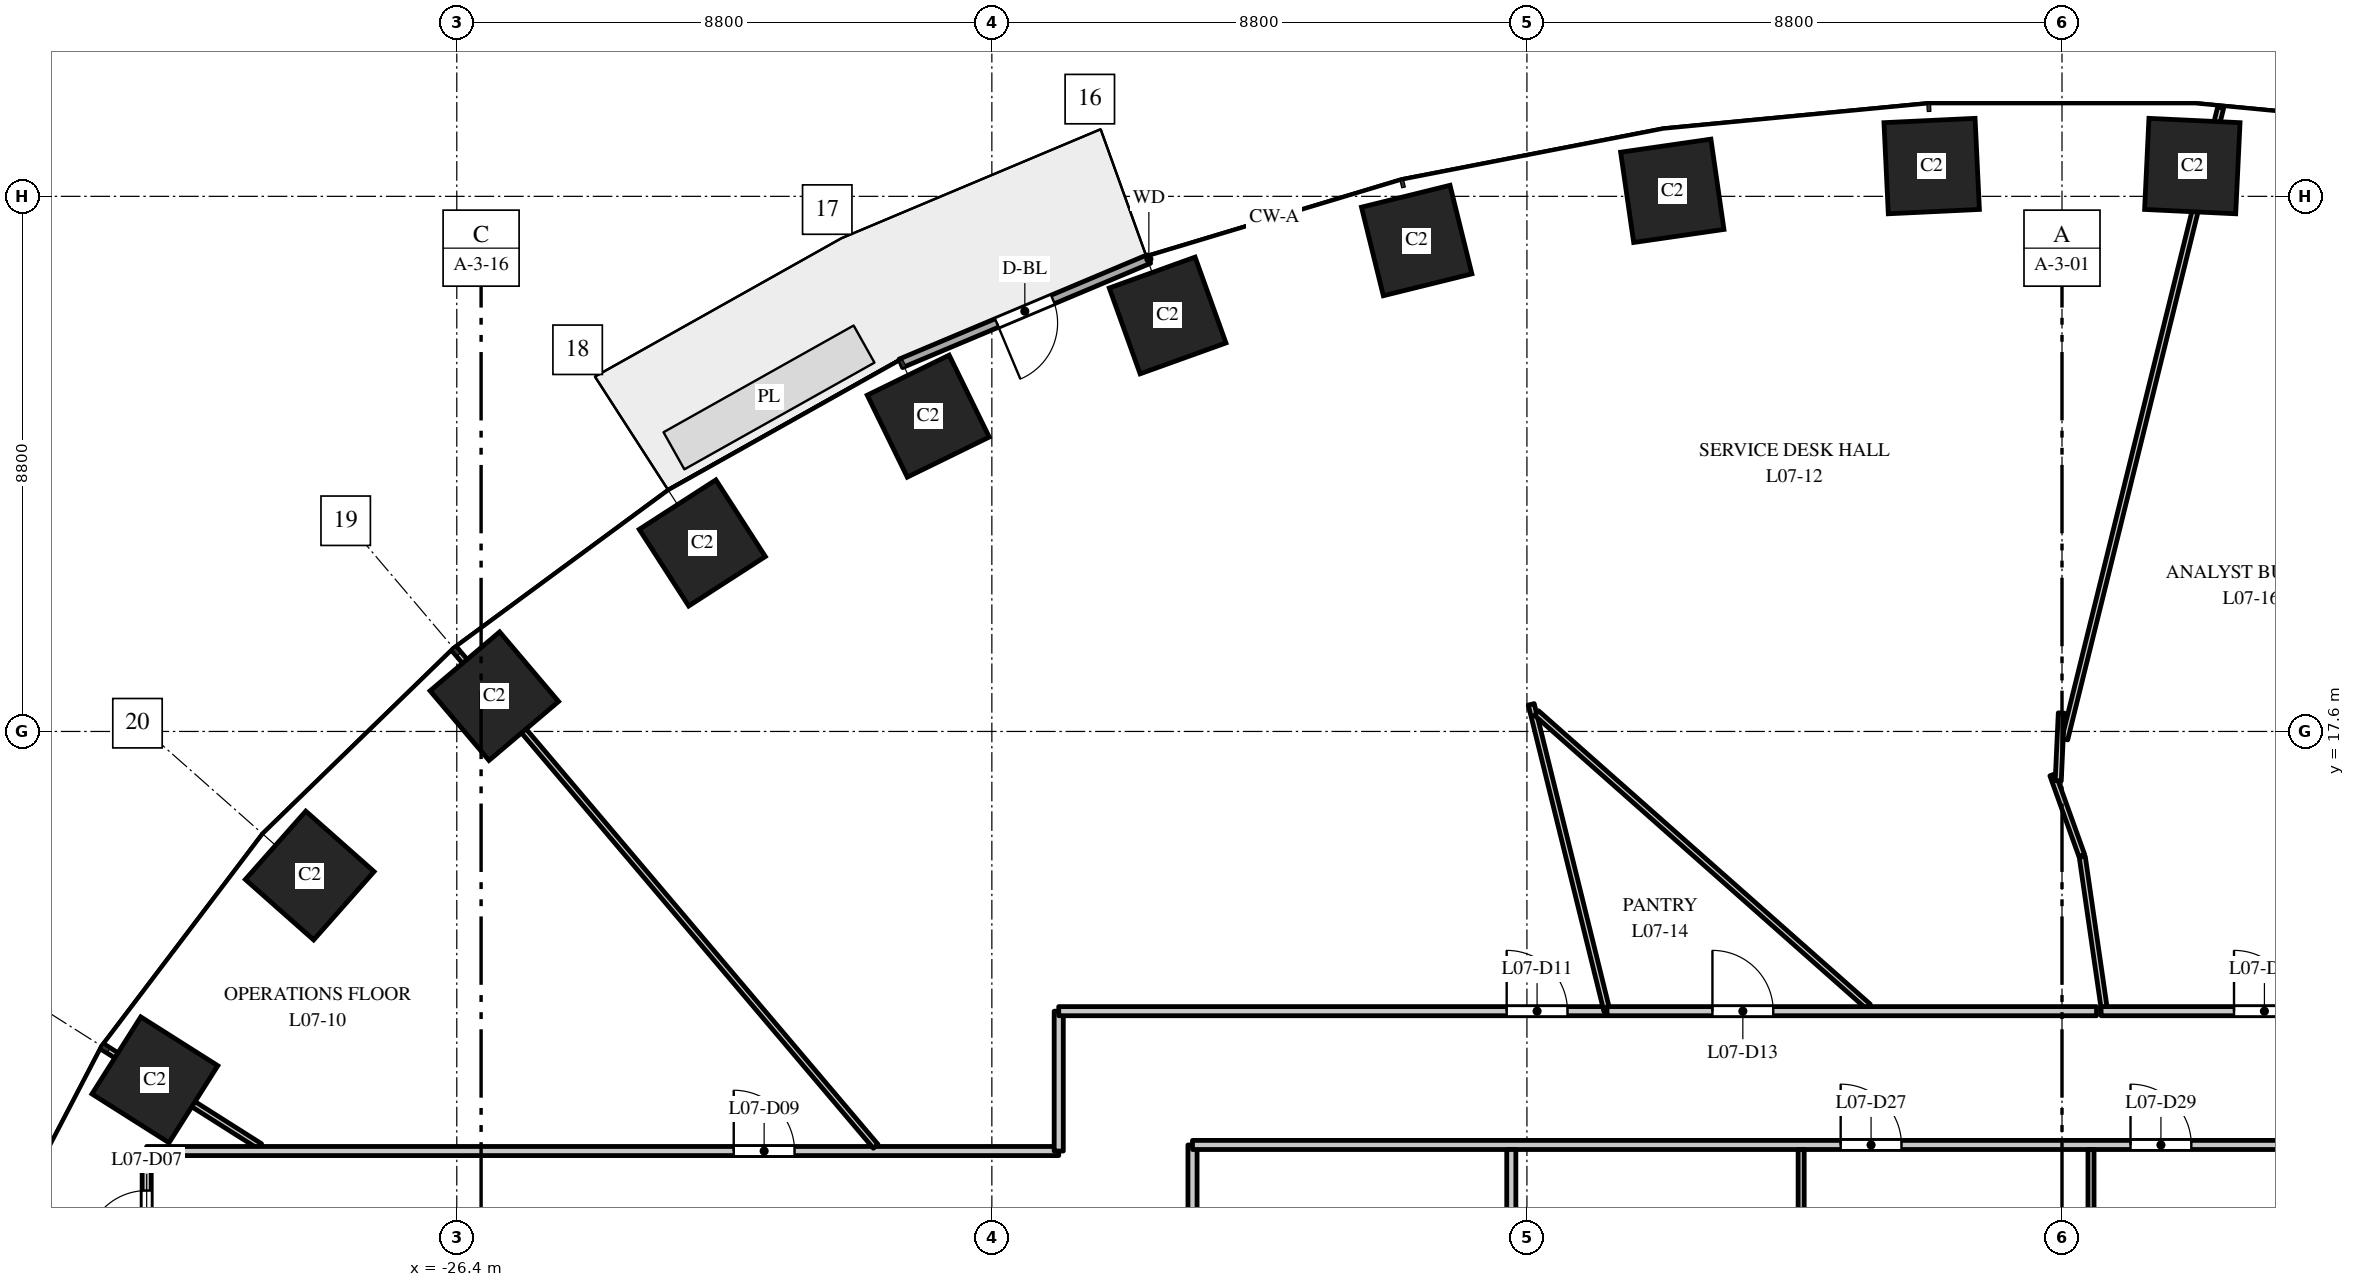
"""IFC4 building model, lengths in metres.
Left out: names, types, materials, properties, quantities, classifications, styles, units other than length and angle.
Written with IfcOpenShell. Run it as: python <this file> out.ifc"""

import sys

from ifc_helpers import new_model, si_unit, direction, frame, frame_2d, origin, origin_2d, place, context, subcontext, project, spatial, rectangle, extrude, element, fill, save


model = new_model("IFC4")
c1 = context("Model", 3, precision=1e-05, world=origin(), true_north=direction((0.0, 1.0)))
c2 = subcontext(c1, "Body", "Model", "MODEL_VIEW")
j1 = project(units=[si_unit("LENGTHUNIT", "METRE"), si_unit("PLANEANGLEUNIT", "RADIAN")], contexts=[c1])
p1 = place(None, origin())
s1 = spatial("IfcSite", under=j1, at=p1, CompositionType="ELEMENT")
p2 = place(p1, origin())
s2 = spatial("IfcBuilding", under=s1, at=p2, CompositionType="ELEMENT")
p3 = place(p2, frame((0.0, 0.0, 38.5)))
s3 = spatial("IfcBuildingStorey", under=s2, at=p3, CompositionType="ELEMENT", Elevation=38.5)
for number, where, z_axis, x_axis in (
    (1, (2.143, 26.898, 0.0), (0.0, 0.0, 1.0), (-0.999, 0.048, 0.0)),
    (2, (-2.143, 26.898, 0.0), (0.0, 0.0, 1.0), (-0.999, -0.048, 0.0)),
    (3, (-6.409, 26.491, 0.0), (0.0, 0.0, 1.0), (-0.99, -0.143, 0.0)),
    (4, (-10.613, 25.674, 0.0), (0.0, 0.0, 1.0), (-0.971, -0.24, 0.0)),
    (5, (-14.709, 24.441, 0.0), (0.0, 0.0, 1.0), (-0.941, -0.338, 0.0)),
    (6, (-18.646, 22.785, 0.0), (0.0, 0.0, 1.0), (-0.898, -0.439, 0.0)),
    (7, (-22.362, 20.7, 0.0), (0.0, 0.0, 1.0), (-0.84, -0.542, 0.0)),
    (8, (-25.783, 18.18, 0.0), (0.0, 0.0, 1.0), (-0.763, -0.646, 0.0)),
    (9, (-28.819, 15.23, 0.0), (0.0, 0.0, 1.0), (-0.663, -0.749, 0.0)),
    (10, (-31.365, 11.871, 0.0), (0.0, 0.0, 1.0), (-0.535, -0.845, 0.0)),
):
    element("IfcColumn", number, at=place(p3, frame(where, z_axis=z_axis, x_axis=x_axis)), inside=s3, PredefinedType="COLUMN", context=c2, shape_type="SweptSolid", body=[
        extrude(rectangle(XDim=1.5, YDim=1.5, at=origin_2d()), origin(), (0.0, 0.0, 1.0), 4.0),
    ])
p4 = place(p3, frame((-15.018, 25.369, 0.0), z_axis=(0.0, 0.0, 1.0), x_axis=(-0.921816985161, -0.387625393736, 0.0)))
e11 = element("IfcWall", 11, at=p4, inside=s3, PredefinedType="STANDARD", context=c2, shape_type="SweptSolid", body=[
    extrude(rectangle(XDim=4.426, YDim=0.15, at=frame_2d((2.213, 0.0))), origin(), (0.0, 0.0, 1.0), 3.7),
])
p5 = place(p4, frame((1.713, 0.0, 0.0)))
e12 = element("IfcOpeningElement", 12, at=p5, cuts=e11, PredefinedType="OPENING", context=c2, shape_type="SweptSolid", body=[
    extrude(rectangle(XDim=1.0, YDim=2.4, at=frame_2d((0.5, 1.2))), frame((0.0, 0.085, 0.0), z_axis=(0.0, -1.0, 0.0), x_axis=(1.0, 0.0, 0.0)), (0.0, 0.0, 1.0), 0.17),
])
p6 = place(p3, frame((-32.212, 12.408, 0.0), z_axis=(0.0, 0.0, 1.0), x_axis=(0.844810627195, -0.535065420467, 0.0)))
e13 = element("IfcWall", 13, at=p6, inside=s3, PredefinedType="PARTITIONING", context=c2, shape_type="SweptSolid", body=[
    extrude(rectangle(XDim=3.048, YDim=0.1, at=frame_2d((1.524, 0.0))), origin(), (0.0, 0.0, 1.0), 3.7),
])
p7 = place(p3, frame((-31.5, 8.5, 0.0), z_axis=(0.0, 0.0, 1.0), x_axis=(0.0, 1.0, 0.0)))
e14 = element("IfcWall", 14, at=p7, inside=s3, PredefinedType="PARTITIONING", context=c2, shape_type="SweptSolid", body=[
    extrude(rectangle(XDim=2.2, YDim=0.15, at=frame_2d((1.1, 0.0))), origin(), (0.0, 0.0, 1.0), 3.7),
])
p8 = place(p7, frame((0.55, 0.0, 0.0)))
e15 = element("IfcOpeningElement", 15, at=p8, cuts=e14, PredefinedType="OPENING", context=c2, shape_type="SweptSolid", body=[
    extrude(rectangle(XDim=1.0, YDim=2.1, at=frame_2d((0.5, 1.05))), frame((0.0, 0.085, 0.0), z_axis=(0.0, -1.0, 0.0), x_axis=(1.0, 0.0, 0.0)), (0.0, 0.0, 1.0), 0.17),
])
p9 = place(p3, frame((-31.5, 10.7, 0.0), z_axis=(0.0, 0.0, 1.0), x_axis=(1.0, 0.0, 0.0)))
e16 = element("IfcWall", 16, at=p9, inside=s3, PredefinedType="PARTITIONING", context=c2, shape_type="SweptSolid", body=[
    extrude(rectangle(XDim=15.0, YDim=0.15, at=frame_2d((7.5, 0.0))), origin(), (0.0, 0.0, 1.0), 3.1),
])
p10 = place(p9, frame((9.655, 0.0, 0.0)))
e17 = element("IfcOpeningElement", 17, at=p10, cuts=e16, PredefinedType="OPENING", context=c2, shape_type="SweptSolid", body=[
    extrude(rectangle(XDim=1.0, YDim=2.1, at=frame_2d((0.5, 1.05))), frame((0.0, 0.085, 0.0), z_axis=(0.0, -1.0, 0.0), x_axis=(1.0, 0.0, 0.0)), (0.0, 0.0, 1.0), 0.17),
])
p11 = place(p3, frame((-26.43, 18.945, 0.0), z_axis=(0.0, 0.0, 1.0), x_axis=(0.646400187952, -0.762998556365, 0.0)))
e18 = element("IfcWall", 18, at=p11, inside=s3, PredefinedType="PARTITIONING", context=c2, shape_type="SweptSolid", body=[
    extrude(rectangle(XDim=10.704, YDim=0.1, at=frame_2d((5.352, 0.0))), origin(), (0.0, 0.0, 1.0), 3.7),
])
p12 = place(p3, frame((-16.5, 10.7, 0.0), z_axis=(0.0, 0.0, 1.0), x_axis=(0.0, 1.0, 0.0)))
e19 = element("IfcWall", 19, at=p12, inside=s3, PredefinedType="PARTITIONING", context=c2, shape_type="SweptSolid", body=[
    extrude(rectangle(XDim=2.3, YDim=0.15, at=frame_2d((1.15, 0.0))), origin(), (0.0, 0.0, 1.0), 2.75),
])
p13 = place(p3, frame((-16.5, 13.0, 0.0), z_axis=(0.0, 0.0, 1.0), x_axis=(1.0, 0.0, 0.0)))
e20 = element("IfcWall", 20, at=p13, inside=s3, PredefinedType="PARTITIONING", context=c2, shape_type="SweptSolid", body=[
    extrude(rectangle(XDim=9.001, YDim=0.15, at=frame_2d((4.5, 0.0))), origin(), (0.0, 0.0, 1.0), 2.85),
])
p14 = place(p13, frame((7.367, 0.0, 0.0)))
e21 = element("IfcOpeningElement", 21, at=p14, cuts=e20, PredefinedType="OPENING", context=c2, shape_type="SweptSolid", body=[
    extrude(rectangle(XDim=1.0, YDim=2.1, at=frame_2d((0.5, 1.05))), frame((0.0, 0.085, 0.0), z_axis=(0.0, -1.0, 0.0), x_axis=(1.0, 0.0, 0.0)), (0.0, 0.0, 1.0), 0.17),
])
p15 = place(p3, frame((-14.3, -10.8, 0.0), z_axis=(0.0, 0.0, 1.0), x_axis=(0.0, 1.0, 0.0)))
e22 = element("IfcWall", 22, at=p15, inside=s3, PredefinedType="PARTITIONING", context=c2, shape_type="SweptSolid", body=[
    extrude(rectangle(XDim=21.6, YDim=0.15, at=frame_2d((10.8, 0.0))), origin(), (0.0, 0.0, 1.0), 2.75),
])
p16 = place(p15, frame((0.65, 0.0, 0.0)))
e23 = element("IfcOpeningElement", 23, at=p16, cuts=e22, PredefinedType="OPENING", context=c2, shape_type="SweptSolid", body=[
    extrude(rectangle(XDim=1.0, YDim=2.1, at=frame_2d((0.5, 1.05))), frame((0.0, 0.085, 0.0), z_axis=(0.0, -1.0, 0.0), x_axis=(1.0, 0.0, 0.0)), (0.0, 0.0, 1.0), 0.17),
])
p17 = place(p3, frame((-14.3, 10.8, 0.0), z_axis=(0.0, 0.0, 1.0), x_axis=(1.0, 0.0, 0.0)))
e24 = element("IfcWall", 24, at=p17, inside=s3, PredefinedType="PARTITIONING", context=c2, shape_type="SweptSolid", body=[
    extrude(rectangle(XDim=28.6, YDim=0.15, at=frame_2d((14.3, 0.0))), origin(), (0.0, 0.0, 1.0), 2.85),
])
p18 = place(p17, frame((10.66, 0.0, 0.0)))
e25 = element("IfcOpeningElement", 25, at=p18, cuts=e24, PredefinedType="OPENING", context=c2, shape_type="SweptSolid", body=[
    extrude(rectangle(XDim=1.0, YDim=2.1, at=frame_2d((0.5, 1.05))), frame((0.0, 0.085, 0.0), z_axis=(0.0, -1.0, 0.0), x_axis=(1.0, 0.0, 0.0)), (0.0, 0.0, 1.0), 0.17),
])
p19 = place(p17, frame((15.427, 0.0, 0.0)))
e26 = element("IfcOpeningElement", 26, at=p19, cuts=e24, PredefinedType="OPENING", context=c2, shape_type="SweptSolid", body=[
    extrude(rectangle(XDim=1.0, YDim=2.1, at=frame_2d((0.5, 1.05))), frame((0.0, 0.085, 0.0), z_axis=(0.0, -1.0, 0.0), x_axis=(1.0, 0.0, 0.0)), (0.0, 0.0, 1.0), 0.17),
])
p20 = place(p17, frame((22.693, 0.0, 0.0)))
e27 = element("IfcOpeningElement", 27, at=p20, cuts=e24, PredefinedType="OPENING", context=c2, shape_type="SweptSolid", body=[
    extrude(rectangle(XDim=1.0, YDim=2.1, at=frame_2d((0.5, 1.05))), frame((0.0, 0.085, 0.0), z_axis=(0.0, -1.0, 0.0), x_axis=(1.0, 0.0, 0.0)), (0.0, 0.0, 1.0), 0.17),
])
p21 = place(p3, frame((-9.057, 0.045, 0.0), z_axis=(0.0, 0.0, 1.0), x_axis=(0.0, 1.0, 0.0)))
e28 = element("IfcWall", 28, at=p21, inside=s3, PredefinedType="PARTITIONING", context=c2, shape_type="SweptSolid", body=[
    extrude(rectangle(XDim=10.68, YDim=0.15, at=frame_2d((5.34, 0.0))), origin(), (0.0, 0.0, 1.0), 2.75),
])
p22 = place(p21, frame((4.61, 0.0, 0.0)))
e29 = element("IfcOpeningElement", 29, at=p22, cuts=e28, PredefinedType="OPENING", context=c2, shape_type="SweptSolid", body=[
    extrude(rectangle(XDim=1.0, YDim=2.1, at=frame_2d((0.5, 1.05))), frame((0.0, 0.085, 0.0), z_axis=(0.0, -1.0, 0.0), x_axis=(1.0, 0.0, 0.0)), (0.0, 0.0, 1.0), 0.17),
])
p23 = place(p3, frame((-8.729, 18.046, 0.0), z_axis=(0.0, 0.0, 1.0), x_axis=(0.239749411988, -0.970834805439, 0.0)))
e30 = element("IfcWall", 30, at=p23, inside=s3, PredefinedType="PARTITIONING", context=c2, shape_type="SweptSolid", body=[
    extrude(rectangle(XDim=5.198, YDim=0.1, at=frame_2d((2.599, 0.0))), origin(), (0.0, 0.0, 1.0), 3.7),
])
p24 = place(p3, frame((-8.642, 17.903, 0.0), z_axis=(0.0, 0.0, 1.0), x_axis=(0.749027274438, -0.662539162728, 0.0)))
e31 = element("IfcWall", 31, at=p24, inside=s3, PredefinedType="PARTITIONING", context=c2, shape_type="SweptSolid", body=[
    extrude(rectangle(XDim=7.283, YDim=0.1, at=frame_2d((3.642, 0.0))), origin(), (0.0, 0.0, 1.0), 2.85),
])
p25 = place(p3, frame((-7.483, 13.0, 0.0), z_axis=(0.0, 0.0, 1.0), x_axis=(1.0, 0.0, 0.0)))
e32 = element("IfcWall", 32, at=p25, inside=s3, PredefinedType="PARTITIONING", context=c2, shape_type="SweptSolid", body=[
    extrude(rectangle(XDim=8.051, YDim=0.15, at=frame_2d((4.025, 0.0))), origin(), (0.0, 0.0, 1.0), 2.85),
])
p26 = place(p25, frame((1.734, 0.0, 0.0)))
e33 = element("IfcOpeningElement", 33, at=p26, cuts=e32, PredefinedType="OPENING", context=c2, shape_type="SweptSolid", body=[
    extrude(rectangle(XDim=1.0, YDim=2.1, at=frame_2d((0.5, 1.05))), frame((0.0, 0.085, 0.0), z_axis=(0.0, -1.0, 0.0), x_axis=(1.0, 0.0, 0.0)), (0.0, 0.0, 1.0), 0.17),
])
p27 = place(p3, frame((-4.29, 6.568, 0.0), z_axis=(0.0, 0.0, 1.0), x_axis=(0.0, 1.0, 0.0)))
e34 = element("IfcWall", 34, at=p27, inside=s3, PredefinedType="PARTITIONING", context=c2, shape_type="SweptSolid", body=[
    extrude(rectangle(XDim=4.157, YDim=0.1, at=frame_2d((2.079, 0.0))), origin(), (0.0, 0.0, 1.0), 2.85),
])
p28 = place(p3, frame((-0.152, 16.888, 0.0), z_axis=(0.0, 0.0, 1.0), x_axis=(0.338272836404, -0.941048079617, 0.0)))
e35 = element("IfcWall", 35, at=p28, inside=s3, PredefinedType="PARTITIONING", context=c2, shape_type="SweptSolid", body=[
    extrude(rectangle(XDim=1.413, YDim=0.1, at=frame_2d((0.707, 0.0))), origin(), (0.0, 0.0, 1.0), 3.7),
])
p29 = place(p3, frame((0.045, 17.473, 0.0), z_axis=(0.0, 0.0, 1.0), x_axis=(0.239693715076, 0.970848558197, 0.0)))
e36 = element("IfcWall", 36, at=p29, inside=s3, PredefinedType="PARTITIONING", context=c2, shape_type="SweptSolid", body=[
    extrude(rectangle(XDim=10.697, YDim=0.1, at=frame_2d((5.348, 0.0))), origin(), (0.0, 0.0, 1.0), 2.85),
])
p30 = place(p3, frame((-0.062, 16.789, 0.0), z_axis=(0.0, 0.0, 1.0), x_axis=(0.045715238231, 0.998954511974, 0.0)))
e37 = element("IfcWall", 37, at=p30, inside=s3, PredefinedType="PARTITIONING", context=c2, shape_type="SweptSolid", body=[
    extrude(rectangle(XDim=1.116, YDim=0.1, at=frame_2d((0.558, 0.0))), origin(), (0.0, 0.0, 1.0), 3.7),
])
p31 = place(p3, frame((0.333, 15.539, 0.0), z_axis=(0.0, 0.0, 1.0), x_axis=(0.143115891067, -0.989705936996, 0.0)))
e38 = element("IfcWall", 38, at=p31, inside=s3, PredefinedType="PARTITIONING", context=c2, shape_type="SweptSolid", body=[
    extrude(rectangle(XDim=2.501, YDim=0.1, at=frame_2d((1.25, 0.0))), origin(), (0.0, 0.0, 1.0), 3.7),
])
p32 = place(p3, frame((0.477, 7.468, 0.0), z_axis=(0.0, 0.0, 1.0), x_axis=(0.0, 1.0, 0.0)))
e39 = element("IfcWall", 39, at=p32, inside=s3, PredefinedType="PARTITIONING", context=c2, shape_type="SweptSolid", body=[
    extrude(rectangle(XDim=3.257, YDim=0.1, at=frame_2d((1.628, 0.0))), origin(), (0.0, 0.0, 1.0), 2.85),
])
p33 = place(p3, frame((0.643, 13.0, 0.0), z_axis=(0.0, 0.0, 1.0), x_axis=(1.0, 0.0, 0.0)))
e40 = element("IfcWall", 40, at=p33, inside=s3, PredefinedType="PARTITIONING", context=c2, shape_type="SweptSolid", body=[
    extrude(rectangle(XDim=3.816, YDim=0.15, at=frame_2d((1.908, 0.0))), origin(), (0.0, 0.0, 1.0), 2.85),
])
p34 = place(p33, frame((2.186, 0.0, 0.0)))
e41 = element("IfcOpeningElement", 41, at=p34, cuts=e40, PredefinedType="OPENING", context=c2, shape_type="SweptSolid", body=[
    extrude(rectangle(XDim=1.0, YDim=2.1, at=frame_2d((0.5, 1.05))), frame((0.0, 0.085, 0.0), z_axis=(0.0, -1.0, 0.0), x_axis=(1.0, 0.0, 0.0)), (0.0, 0.0, 1.0), 0.17),
])
p35 = place(p5, origin())
e42 = element("IfcDoor", 42, at=p35, inside=s3, OperationType="SINGLE_SWING_RIGHT", PredefinedType="DOOR", context=c2, shape_type="SweptSolid", body=[
    extrude(rectangle(XDim=1.0, YDim=2.4, at=frame_2d((0.5, 1.2))), frame((0.0, 0.025, 0.0), z_axis=(0.0, -1.0, 0.0), x_axis=(1.0, 0.0, 0.0)), (0.0, 0.0, 1.0), 0.05),
])
fill(e12, e42)
p36 = place(p8, origin())
e43 = element("IfcDoor", 43, at=p36, inside=s3, OperationType="SINGLE_SWING_LEFT", PredefinedType="DOOR", context=c2, shape_type="SweptSolid", body=[
    extrude(rectangle(XDim=1.0, YDim=2.1, at=frame_2d((0.5, 1.05))), frame((0.0, 0.025, 0.0), z_axis=(0.0, -1.0, 0.0), x_axis=(1.0, 0.0, 0.0)), (0.0, 0.0, 1.0), 0.05),
])
fill(e15, e43)
p37 = place(p10, origin())
e44 = element("IfcDoor", 44, at=p37, inside=s3, OperationType="SINGLE_SWING_LEFT", PredefinedType="DOOR", context=c2, shape_type="SweptSolid", body=[
    extrude(rectangle(XDim=1.0, YDim=2.1, at=frame_2d((0.5, 1.05))), frame((0.0, 0.025, 0.0), z_axis=(0.0, -1.0, 0.0), x_axis=(1.0, 0.0, 0.0)), (0.0, 0.0, 1.0), 0.05),
])
fill(e17, e44)
p38 = place(p14, origin())
e45 = element("IfcDoor", 45, at=p38, inside=s3, OperationType="SINGLE_SWING_LEFT", PredefinedType="DOOR", context=c2, shape_type="SweptSolid", body=[
    extrude(rectangle(XDim=1.0, YDim=2.1, at=frame_2d((0.5, 1.05))), frame((0.0, 0.025, 0.0), z_axis=(0.0, -1.0, 0.0), x_axis=(1.0, 0.0, 0.0)), (0.0, 0.0, 1.0), 0.05),
])
fill(e21, e45)
p39 = place(p26, origin())
e46 = element("IfcDoor", 46, at=p39, inside=s3, OperationType="SINGLE_SWING_LEFT", PredefinedType="DOOR", context=c2, shape_type="SweptSolid", body=[
    extrude(rectangle(XDim=1.0, YDim=2.1, at=frame_2d((0.5, 1.05))), frame((0.0, 0.025, 0.0), z_axis=(0.0, -1.0, 0.0), x_axis=(1.0, 0.0, 0.0)), (0.0, 0.0, 1.0), 0.05),
])
fill(e33, e46)
p40 = place(p34, origin())
e47 = element("IfcDoor", 47, at=p40, inside=s3, OperationType="SINGLE_SWING_LEFT", PredefinedType="DOOR", context=c2, shape_type="SweptSolid", body=[
    extrude(rectangle(XDim=1.0, YDim=2.1, at=frame_2d((0.5, 1.05))), frame((0.0, 0.025, 0.0), z_axis=(0.0, -1.0, 0.0), x_axis=(1.0, 0.0, 0.0)), (0.0, 0.0, 1.0), 0.05),
])
fill(e41, e47)
p41 = place(p18, origin())
e48 = element("IfcDoor", 48, at=p41, inside=s3, OperationType="SINGLE_SWING_LEFT", PredefinedType="DOOR", context=c2, shape_type="SweptSolid", body=[
    extrude(rectangle(XDim=1.0, YDim=2.1, at=frame_2d((0.5, 1.05))), frame((0.0, 0.025, 0.0), z_axis=(0.0, -1.0, 0.0), x_axis=(1.0, 0.0, 0.0)), (0.0, 0.0, 1.0), 0.05),
])
fill(e25, e48)
p42 = place(p19, origin())
e49 = element("IfcDoor", 49, at=p42, inside=s3, OperationType="SINGLE_SWING_LEFT", PredefinedType="DOOR", context=c2, shape_type="SweptSolid", body=[
    extrude(rectangle(XDim=1.0, YDim=2.1, at=frame_2d((0.5, 1.05))), frame((0.0, 0.025, 0.0), z_axis=(0.0, -1.0, 0.0), x_axis=(1.0, 0.0, 0.0)), (0.0, 0.0, 1.0), 0.05),
])
fill(e26, e49)
save(model, sys.argv[1])
